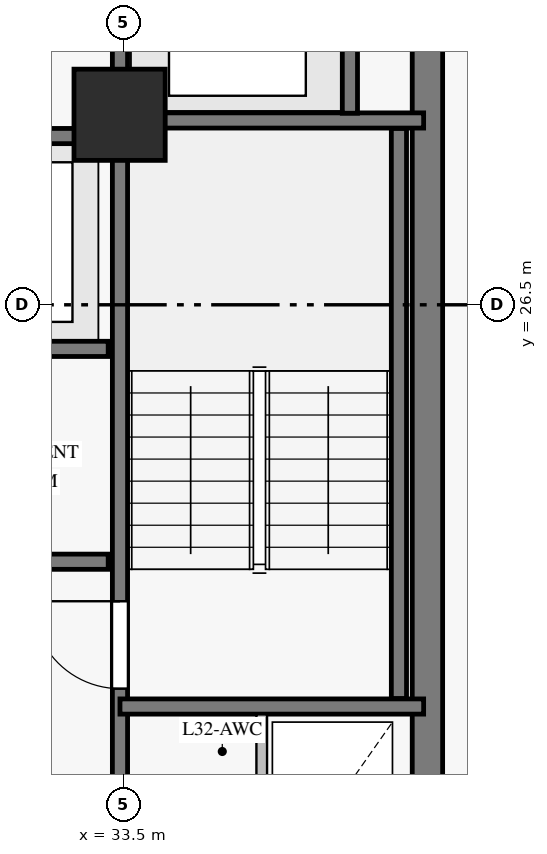
"""IFC4 building model, lengths in metres.
Left out: names, types, materials, properties, quantities, classifications, styles, units other than length and angle.
Written with IfcOpenShell. Run it as: python <this file> out.ifc"""

import sys

from ifc_helpers import new_model, si_unit, direction, frame, frame_2d, origin, origin_with_axes, origin_2d, place, context, subcontext, project, spatial, rectangle, extrude, source, transform, mapped, element, fill, save


model = new_model("IFC4")
c1 = context("Model", 3, precision=1e-05, world=origin(), true_north=direction((0.0, 1.0)))
c2 = subcontext(c1, "Body", "Model", "MODEL_VIEW")
j1 = project(units=[si_unit("LENGTHUNIT", "METRE"), si_unit("PLANEANGLEUNIT", "RADIAN")], contexts=[c1])
p1 = place(None, origin())
s1 = spatial("IfcSite", under=j1, at=p1, CompositionType="ELEMENT")
p2 = place(p1, origin())
s2 = spatial("IfcBuilding", under=s1, at=p2, CompositionType="ELEMENT")
p3 = place(p2, frame((0.0, 0.0, 117.55)))
s3 = spatial("IfcBuildingStorey", under=s2, at=p3, CompositionType="ELEMENT", Elevation=117.55)
p4 = place(p3, frame((37.5, 18.3, 0.0), z_axis=(0.0, 0.0, 1.0), x_axis=(0.0, 1.0, 0.0)))
e1 = element("IfcWall", 1, at=p4, inside=s3, PredefinedType="SHEAR", context=c2, shape_type="SweptSolid", body=[
    extrude(rectangle(XDim=16.4, YDim=0.4, at=frame_2d((8.2, 0.0))), origin(), (0.0, 0.0, 1.0), 2.825),
])
p5 = place(p4, frame((14.15, 0.0, 0.0)))
e2 = element("IfcOpeningElement", 2, at=p5, cuts=e1, PredefinedType="OPENING", context=c2, shape_type="SweptSolid", body=[
    extrude(rectangle(XDim=1.2, YDim=2.15, at=frame_2d((0.6, 1.075))), frame((0.0, 0.21, 0.0), z_axis=(0.0, -1.0, 0.0), x_axis=(1.0, 0.0, 0.0)), (0.0, 0.0, 1.0), 0.42),
])
m1 = source(origin_with_axes(), c2, "Body", "SweptSolid", [
    extrude(rectangle(XDim=1.2, YDim=1.2, at=origin_2d()), origin(), (0.0, 0.0, 1.0), 3.05),
])
p6 = place(p3, frame((33.45, 29.0, 0.0), z_axis=(0.0, 0.0, 1.0), x_axis=(1.0, 0.0, 0.0)))
e3 = element("IfcColumn", 3, at=p6, inside=s3, PredefinedType="COLUMN", context=c2, shape_type="MappedRepresentation", body=[
    mapped(m1, transform((0.0, 0.0, 0.0), scale=1.0)),
])
p7 = place(p3, frame((33.455, 18.7, 0.0), z_axis=(0.0, 0.0, 1.0), x_axis=(0.0, 1.0, 0.0)))
e4 = element("IfcWall", 4, at=p7, inside=s3, PredefinedType="SHEAR", context=c2, shape_type="SweptSolid", body=[
    extrude(rectangle(XDim=15.6, YDim=0.2, at=frame_2d((7.8, 0.0))), origin(), (0.0, 0.0, 1.0), 2.825),
])
p8 = place(p7, frame((2.75, 0.0, 0.0)))
e5 = element("IfcOpeningElement", 5, at=p8, cuts=e4, PredefinedType="OPENING", context=c2, shape_type="SweptSolid", body=[
    extrude(rectangle(XDim=1.15, YDim=2.15, at=frame_2d((0.575, 1.075))), frame((0.0, 0.11, 0.0), z_axis=(0.0, -1.0, 0.0), x_axis=(1.0, 0.0, 0.0)), (0.0, 0.0, 1.0), 0.22),
])
p9 = place(p7, frame((0.55, 0.0, 0.0)))
e6 = element("IfcOpeningElement", 6, at=p9, cuts=e4, PredefinedType="OPENING", context=c2, shape_type="SweptSolid", body=[
    extrude(rectangle(XDim=0.94, YDim=2.1, at=frame_2d((0.47, 1.05))), frame((0.0, 0.11, 0.0), z_axis=(0.0, -1.0, 0.0), x_axis=(1.0, 0.0, 0.0)), (0.0, 0.0, 1.0), 0.22),
])
p10 = place(p3, frame((23.7, 23.12, 0.0), z_axis=(0.0, 0.0, 1.0), x_axis=(1.0, 0.0, 0.0)))
e7 = element("IfcWall", 7, at=p10, inside=s3, PredefinedType="SHEAR", context=c2, shape_type="SweptSolid", body=[
    extrude(rectangle(XDim=9.6, YDim=0.2, at=frame_2d((4.8, 0.0))), origin(), (0.0, 0.0, 1.0), 2.825),
])
p11 = place(p10, frame((1.1, 0.0, 0.0)))
e8 = element("IfcOpeningElement", 8, at=p11, cuts=e7, PredefinedType="OPENING", context=c2, shape_type="SweptSolid", body=[
    extrude(rectangle(XDim=0.92, YDim=2.1, at=frame_2d((0.46, 1.05))), frame((0.0, 0.11, 0.0), z_axis=(0.0, -1.0, 0.0), x_axis=(1.0, 0.0, 0.0)), (0.0, 0.0, 1.0), 0.22),
])
p12 = place(p10, frame((5.2, 0.0, 0.0)))
e9 = element("IfcOpeningElement", 9, at=p12, cuts=e7, PredefinedType="OPENING", context=c2, shape_type="SweptSolid", body=[
    extrude(rectangle(XDim=1.0, YDim=2.15, at=frame_2d((0.5, 1.075))), frame((0.0, 0.11, 0.0), z_axis=(0.0, -1.0, 0.0), x_axis=(1.0, 0.0, 0.0)), (0.0, 0.0, 1.0), 0.22),
])
p13 = place(p3, frame((23.7, 25.92, 0.0), z_axis=(0.0, 0.0, 1.0), x_axis=(1.0, 0.0, 0.0)))
e10 = element("IfcWall", 10, at=p13, inside=s3, PredefinedType="SHEAR", context=c2, shape_type="SweptSolid", body=[
    extrude(rectangle(XDim=9.6, YDim=0.2, at=frame_2d((4.8, 0.0))), origin(), (0.0, 0.0, 1.0), 2.825),
])
p14 = place(p3, frame((23.7, 28.72, 0.0), z_axis=(0.0, 0.0, 1.0), x_axis=(1.0, 0.0, 0.0)))
e11 = element("IfcWall", 11, at=p14, inside=s3, PredefinedType="SHEAR", context=c2, shape_type="SweptSolid", body=[
    extrude(rectangle(XDim=9.6, YDim=0.2, at=frame_2d((4.8, 0.0))), origin(), (0.0, 0.0, 1.0), 2.825),
])
p15 = place(p14, frame((0.6, 0.0, 0.0)))
e12 = element("IfcOpeningElement", 12, at=p15, cuts=e11, PredefinedType="OPENING", context=c2, shape_type="SweptSolid", body=[
    extrude(rectangle(XDim=1.1, YDim=2.15, at=frame_2d((0.55, 1.075))), frame((0.0, 0.11, 0.0), z_axis=(0.0, -1.0, 0.0), x_axis=(1.0, 0.0, 0.0)), (0.0, 0.0, 1.0), 0.22),
])
p16 = place(p14, frame((2.98, 0.0, 0.0)))
e13 = element("IfcOpeningElement", 13, at=p16, cuts=e11, PredefinedType="OPENING", context=c2, shape_type="SweptSolid", body=[
    extrude(rectangle(XDim=1.1, YDim=2.15, at=frame_2d((0.55, 1.075))), frame((0.0, 0.11, 0.0), z_axis=(0.0, -1.0, 0.0), x_axis=(1.0, 0.0, 0.0)), (0.0, 0.0, 1.0), 0.22),
])
p17 = place(p14, frame((5.36, 0.0, 0.0)))
e14 = element("IfcOpeningElement", 14, at=p17, cuts=e11, PredefinedType="OPENING", context=c2, shape_type="SweptSolid", body=[
    extrude(rectangle(XDim=1.1, YDim=2.15, at=frame_2d((0.55, 1.075))), frame((0.0, 0.11, 0.0), z_axis=(0.0, -1.0, 0.0), x_axis=(1.0, 0.0, 0.0)), (0.0, 0.0, 1.0), 0.22),
])
p18 = place(p14, frame((7.74, 0.0, 0.0)))
e15 = element("IfcOpeningElement", 15, at=p18, cuts=e11, PredefinedType="OPENING", context=c2, shape_type="SweptSolid", body=[
    extrude(rectangle(XDim=1.1, YDim=2.15, at=frame_2d((0.55, 1.075))), frame((0.0, 0.11, 0.0), z_axis=(0.0, -1.0, 0.0), x_axis=(1.0, 0.0, 0.0)), (0.0, 0.0, 1.0), 0.22),
])
p19 = place(p3, frame((37.125, 21.32, 0.0), z_axis=(0.0, 0.0, 1.0), x_axis=(0.0, 1.0, 0.0)))
e16 = element("IfcWall", 16, at=p19, inside=s3, PredefinedType="SHEAR", context=c2, shape_type="SweptSolid", body=[
    extrude(rectangle(XDim=7.5, YDim=0.2, at=frame_2d((3.75, 0.0))), origin(), (0.0, 0.0, 1.0), 2.825),
])
for number, where, z_axis, x_axis in (
    (17, (33.455, 21.215, 0.0), (0.0, 0.0, 1.0), (1.0, 0.0, 0.0)),
    (18, (33.455, 28.925, 0.0), (0.0, 0.0, 1.0), (1.0, 0.0, 0.0)),
):
    element("IfcWall", number, at=place(p3, frame(where, z_axis=z_axis, x_axis=x_axis)), inside=s3, PredefinedType="SHEAR", context=c2, shape_type="SweptSolid", body=[
        extrude(rectangle(XDim=3.995, YDim=0.2, at=frame_2d((1.998, 0.0))), origin(), (0.0, 0.0, 1.0), 2.825),
    ])
p20 = place(p3, frame((36.48, 29.02, 0.0), z_axis=(0.0, 0.0, 1.0), x_axis=(0.0, 1.0, 0.0)))
e19 = element("IfcWall", 19, at=p20, inside=s3, PredefinedType="SHEAR", context=c2, shape_type="SweptSolid", body=[
    extrude(rectangle(XDim=2.86, YDim=0.2, at=frame_2d((1.43, 0.0))), origin(), (0.0, 0.0, 1.0), 2.825),
])
p21 = place(p3, frame((35.32, 18.507, 0.0), z_axis=(0.0, 0.0, 1.0), x_axis=(0.0, 1.0, 0.0)))
e20 = element("IfcWall", 20, at=p21, inside=s3, PredefinedType="PARTITIONING", context=c2, shape_type="SweptSolid", body=[
    extrude(rectangle(XDim=2.604, YDim=0.14, at=frame_2d((1.302, 0.0))), origin(), (0.0, 0.0, 1.0), 2.825),
])
m2 = source(origin_with_axes(), c2, "Body", "SweptSolid", [
    extrude(rectangle(XDim=1.15, YDim=2.15, at=frame_2d((0.575, 1.075))), frame((0.0, 0.025, 0.0), z_axis=(0.0, -1.0, 0.0), x_axis=(1.0, 0.0, 0.0)), (0.0, 0.0, 1.0), 0.05),
])
p22 = place(p8, origin())
e21 = element("IfcDoor", 21, at=p22, inside=s3, OperationType="SINGLE_SWING_RIGHT", PredefinedType="DOOR", context=c2, shape_type="MappedRepresentation", body=[
    mapped(m2, transform((0.0, 0.0, 0.0), scale=1.0)),
])
fill(e5, e21)
save(model, sys.argv[1])
